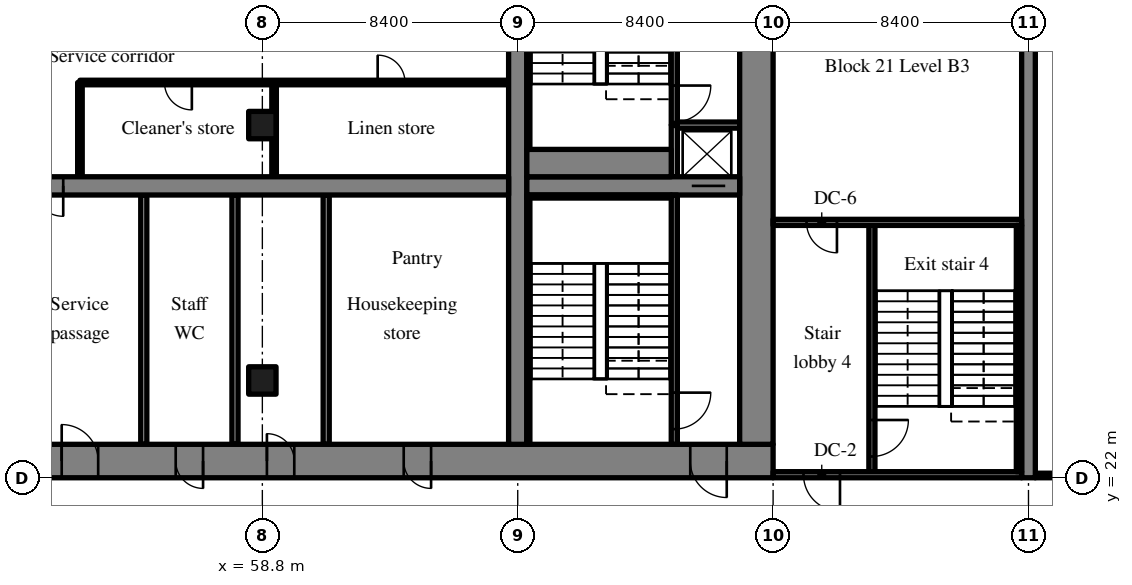
"""IFC4 building model, lengths in metres.
Left out: names, types, materials, properties, quantities, classifications, styles, units other than length and angle.
Written with IfcOpenShell. Run it as: python <this file> out.ifc"""

import sys

from ifc_helpers import new_model, si_unit, direction, frame, frame_2d, origin, origin_2d, place, context, subcontext, project, spatial, rectangle, extrude, source, transform, mapped, element, fill, save


model = new_model("IFC4")
c1 = context("Model", 3, precision=1e-05, world=origin(), true_north=direction((0.0, 1.0)))
c2 = subcontext(c1, "Body", "Model", "MODEL_VIEW")
j1 = project(units=[si_unit("LENGTHUNIT", "METRE"), si_unit("PLANEANGLEUNIT", "RADIAN")], contexts=[c1])
p1 = place(None, origin())
s1 = spatial("IfcSite", under=j1, at=p1, CompositionType="ELEMENT")
p2 = place(p1, origin())
s2 = spatial("IfcBuilding", under=s1, at=p2, CompositionType="ELEMENT")
p3 = place(p2, frame((0.0, 0.0, -13.5)))
s3 = spatial("IfcBuildingStorey", under=s2, at=p3, CompositionType="ELEMENT", Elevation=-13.5)
m1 = source(origin(), c2, "Body", "SweptSolid", [
    extrude(rectangle(XDim=50.4, YDim=1.1, at=frame_2d((25.2, 0.0))), origin(), (0.0, 0.0, 1.0), 4.52),
])
p4 = place(p3, frame((25.2, 22.55, -0.3), z_axis=(0.0, 0.0, 1.0), x_axis=(1.0, 0.0, 0.0)))
e1 = element("IfcWall", 1, at=p4, inside=s3, PredefinedType="SHEAR", context=c2, shape_type="MappedRepresentation", body=[
    mapped(m1, transform((0.0, 0.0, 0.0), scale=1.0)),
])
m2 = source(origin(), c2, "Body", "SweptSolid", [
    extrude(rectangle(XDim=1.8, YDim=2.1, at=frame_2d((0.9, 1.05))), frame((0.0, 0.56, 0.0), z_axis=(0.0, -1.0, 0.0), x_axis=(1.0, 0.0, 0.0)), (0.0, 0.0, 1.0), 1.12),
])
p5 = place(p4, frame((15.9, 0.0, 0.0)))
e2 = element("IfcOpeningElement", 2, at=p5, cuts=e1, PredefinedType="OPENING", context=c2, shape_type="MappedRepresentation", body=[
    mapped(m2, transform((0.0, 0.0, 0.0), scale=1.0)),
])
m3 = source(origin(), c2, "Body", "SweptSolid", [
    extrude(rectangle(XDim=1.2, YDim=2.1, at=frame_2d((0.6, 1.05))), frame((0.0, 0.56, 0.0), z_axis=(0.0, -1.0, 0.0), x_axis=(1.0, 0.0, 0.0)), (0.0, 0.0, 1.0), 1.12),
])
p6 = place(p4, frame((27.0, 0.0, 0.0)))
e3 = element("IfcOpeningElement", 3, at=p6, cuts=e1, PredefinedType="OPENING", context=c2, shape_type="MappedRepresentation", body=[
    mapped(m3, transform((0.0, 0.0, 0.0), scale=1.0)),
])
m4 = source(origin(), c2, "Body", "SweptSolid", [
    extrude(rectangle(XDim=0.9, YDim=2.1, at=frame_2d((0.45, 1.05))), frame((0.0, 0.56, 0.0), z_axis=(0.0, -1.0, 0.0), x_axis=(1.0, 0.0, 0.0)), (0.0, 0.0, 1.0), 1.12),
])
p7 = place(p4, frame((33.75, 0.0, 0.0)))
e4 = element("IfcOpeningElement", 4, at=p7, cuts=e1, PredefinedType="OPENING", context=c2, shape_type="MappedRepresentation", body=[
    mapped(m4, transform((0.0, 0.0, 0.0), scale=1.0)),
])
p8 = place(p4, frame((30.75, 0.0, 0.0)))
e5 = element("IfcOpeningElement", 5, at=p8, cuts=e1, PredefinedType="OPENING", context=c2, shape_type="MappedRepresentation", body=[
    mapped(m4, transform((0.0, 0.0, 0.0), scale=1.0)),
])
p9 = place(p4, frame((38.25, 0.0, 0.0)))
e6 = element("IfcOpeningElement", 6, at=p9, cuts=e1, PredefinedType="OPENING", context=c2, shape_type="MappedRepresentation", body=[
    mapped(m4, transform((0.0, 0.0, 0.0), scale=1.0)),
])
p10 = place(p4, frame((6.425, 0.0, 0.0)))
e7 = element("IfcOpeningElement", 7, at=p10, cuts=e1, PredefinedType="OPENING", context=c2, shape_type="MappedRepresentation", body=[
    mapped(m3, transform((0.0, 0.0, 0.0), scale=1.0)),
])
p11 = place(p4, frame((47.675, 0.0, 0.0)))
e8 = element("IfcOpeningElement", 8, at=p11, cuts=e1, PredefinedType="OPENING", context=c2, shape_type="MappedRepresentation", body=[
    mapped(m3, transform((0.0, 0.0, 0.0), scale=1.0)),
])
m5 = source(origin(), c2, "Body", "SweptSolid", [
    extrude(rectangle(XDim=17.8, YDim=1.1, at=frame_2d((8.9, 0.0))), origin(), (0.0, 0.0, 1.0), 4.52),
])
p12 = place(p3, frame((75.05, 23.1, -0.3), z_axis=(0.0, 0.0, 1.0), x_axis=(0.0, 1.0, 0.0)))
e9 = element("IfcWall", 9, at=p12, inside=s3, PredefinedType="SHEAR", context=c2, shape_type="MappedRepresentation", body=[
    mapped(m5, transform((0.0, 0.0, 0.0), scale=1.0)),
])
m6 = source(origin(), c2, "Body", "SweptSolid", [
    extrude(rectangle(XDim=17.8, YDim=0.6, at=frame_2d((8.9, 0.0))), origin(), (0.0, 0.0, 1.0), 4.52),
])
p13 = place(p3, frame((67.2, 23.1, -0.3), z_axis=(0.0, 0.0, 1.0), x_axis=(0.0, 1.0, 0.0)))
e10 = element("IfcWall", 10, at=p13, inside=s3, PredefinedType="SHEAR", context=c2, shape_type="MappedRepresentation", body=[
    mapped(m6, transform((0.0, 0.0, 0.0), scale=1.0)),
])
m7 = source(origin(), c2, "Body", "SweptSolid", [
    extrude(rectangle(XDim=16.2, YDim=0.6, at=frame_2d((8.1, 0.0))), origin(), (0.0, 0.0, 1.0), 4.52),
])
p14 = place(p3, frame((50.7, 31.6, -0.3), z_axis=(0.0, 0.0, 1.0), x_axis=(1.0, 0.0, 0.0)))
e11 = element("IfcWall", 11, at=p14, inside=s3, PredefinedType="SHEAR", context=c2, shape_type="MappedRepresentation", body=[
    mapped(m7, transform((0.0, 0.0, 0.0), scale=1.0)),
])
m8 = source(origin(), c2, "Body", "SweptSolid", [
    extrude(rectangle(XDim=1.0, YDim=2.1, at=frame_2d((0.5, 1.05))), frame((0.0, 0.31, 0.0), z_axis=(0.0, -1.0, 0.0), x_axis=(1.0, 0.0, 0.0)), (0.0, 0.0, 1.0), 0.62),
])
p15 = place(p14, frame((0.55, 0.0, 0.0)))
e12 = element("IfcOpeningElement", 12, at=p15, cuts=e11, PredefinedType="OPENING", context=c2, shape_type="MappedRepresentation", body=[
    mapped(m8, transform((0.0, 0.0, 0.0), scale=1.0)),
])
m9 = source(origin(), c2, "Body", "SweptSolid", [
    extrude(rectangle(XDim=7.0, YDim=0.6, at=frame_2d((3.5, 0.0))), origin(), (0.0, 0.0, 1.0), 4.52),
])
p16 = place(p3, frame((67.5, 31.6, -0.3), z_axis=(0.0, 0.0, 1.0), x_axis=(1.0, 0.0, 0.0)))
e13 = element("IfcWall", 13, at=p16, inside=s3, PredefinedType="SHEAR", context=c2, shape_type="MappedRepresentation", body=[
    mapped(m9, transform((0.0, 0.0, 0.0), scale=1.0)),
])
m10 = source(origin(), c2, "Body", "SweptSolid", [
    extrude(rectangle(XDim=1.1, YDim=2.1, at=frame_2d((0.55, 1.05))), frame((0.0, 0.31, 0.0), z_axis=(0.0, -1.0, 0.0), x_axis=(1.0, 0.0, 0.0)), (0.0, 0.0, 1.0), 0.62),
])
p17 = place(p16, frame((5.425, 0.0, 0.0)))
e14 = element("IfcOpeningElement", 14, at=p17, cuts=e13, PredefinedType="OPENING", context=c2, shape_type="MappedRepresentation", body=[
    mapped(m10, transform((0.0, 0.0, 0.0), scale=1.0)),
])
m11 = source(origin(), c2, "Body", "SweptSolid", [
    extrude(rectangle(XDim=20.0, YDim=0.45, at=frame_2d((10.0, 0.0))), origin(), (0.0, 0.0, 1.0), 4.52),
])
p18 = place(p3, frame((84.0, 22.0, -0.3), z_axis=(0.0, 0.0, 1.0), x_axis=(0.0, 1.0, 0.0)))
e15 = element("IfcWall", 15, at=p18, inside=s3, PredefinedType="SHEAR", context=c2, shape_type="MappedRepresentation", body=[
    mapped(m11, transform((0.0, 0.0, 0.0), scale=1.0)),
])
m12 = source(origin(), c2, "Body", "SweptSolid", [
    extrude(rectangle(XDim=0.9, YDim=0.9, at=origin_2d()), origin(), (0.0, 0.0, 1.0), 4.52),
])
for number, where, z_axis, x_axis in (
    (16, (58.8, 25.2, -0.3), (0.0, 0.0, 1.0), (1.0, 0.0, 0.0)),
    (17, (58.8, 33.6, -0.3), (0.0, 0.0, 1.0), (1.0, 0.0, 0.0)),
):
    element("IfcColumn", number, at=place(p3, frame(where, z_axis=z_axis, x_axis=x_axis)), inside=s3, PredefinedType="COLUMN", context=c2, shape_type="MappedRepresentation", body=[
        mapped(m12, transform((0.0, 0.0, 0.0), scale=1.0)),
    ])
m13 = source(origin(), c2, "Body", "SweptSolid", [
    extrude(rectangle(XDim=8.2, YDim=0.2, at=frame_2d((4.1, 0.0))), origin(), (0.0, 0.0, 1.0), 4.22),
])
for number, where, z_axis, x_axis in (
    (18, (54.9, 23.1, 0.0), (0.0, 0.0, 1.0), (0.0, 1.0, 0.0)),
    (19, (60.9, 23.1, 0.0), (0.0, 0.0, 1.0), (0.0, 1.0, 0.0)),
    (20, (57.9, 23.1, 0.0), (0.0, 0.0, 1.0), (0.0, 1.0, 0.0)),
):
    element("IfcWall", number, at=place(p3, frame(where, z_axis=z_axis, x_axis=x_axis)), inside=s3, PredefinedType="PARTITIONING", context=c2, shape_type="MappedRepresentation", body=[
        mapped(m13, transform((0.0, 0.0, 0.0), scale=1.0)),
    ])
m14 = source(origin(), c2, "Body", "SweptSolid", [
    extrude(rectangle(XDim=3.1, YDim=0.15, at=frame_2d((1.55, 0.0))), origin(), (0.0, 0.0, 1.0), 4.22),
])
p19 = place(p3, frame((52.8, 31.9, 0.0), z_axis=(0.0, 0.0, 1.0), x_axis=(0.0, 1.0, 0.0)))
e21 = element("IfcWall", 21, at=p19, inside=s3, PredefinedType="PARTITIONING", context=c2, shape_type="MappedRepresentation", body=[
    mapped(m14, transform((0.0, 0.0, 0.0), scale=1.0)),
])
m15 = source(origin(), c2, "Body", "SweptSolid", [
    extrude(rectangle(XDim=14.1, YDim=0.15, at=frame_2d((7.05, 0.0))), origin(), (0.0, 0.0, 1.0), 4.22),
])
p20 = place(p3, frame((66.9, 35.0, 0.0), z_axis=(0.0, 0.0, 1.0), x_axis=(-1.0, 0.0, 0.0)))
e22 = element("IfcWall", 22, at=p20, inside=s3, PredefinedType="PARTITIONING", context=c2, shape_type="MappedRepresentation", body=[
    mapped(m15, transform((0.0, 0.0, 0.0), scale=1.0)),
])
m16 = source(origin(), c2, "Body", "SweptSolid", [
    extrude(rectangle(XDim=0.9, YDim=2.1, at=frame_2d((0.45, 1.05))), frame((0.0, 0.085, 0.0), z_axis=(0.0, -1.0, 0.0), x_axis=(1.0, 0.0, 0.0)), (0.0, 0.0, 1.0), 0.17),
])
p21 = place(p20, frame((3.407, 0.0, 0.0)))
e23 = element("IfcOpeningElement", 23, at=p21, cuts=e22, PredefinedType="OPENING", context=c2, shape_type="MappedRepresentation", body=[
    mapped(m16, transform((0.0, 0.0, 0.0), scale=1.0)),
])
p22 = place(p20, frame((10.419, 0.0, 0.0)))
e24 = element("IfcOpeningElement", 24, at=p22, cuts=e22, PredefinedType="OPENING", context=c2, shape_type="MappedRepresentation", body=[
    mapped(m16, transform((0.0, 0.0, 0.0), scale=1.0)),
])
p23 = place(p3, frame((59.186, 31.9, 0.0), z_axis=(0.0, 0.0, 1.0), x_axis=(0.0, 1.0, 0.0)))
e25 = element("IfcWall", 25, at=p23, inside=s3, PredefinedType="PARTITIONING", context=c2, shape_type="MappedRepresentation", body=[
    mapped(m14, transform((0.0, 0.0, 0.0), scale=1.0)),
])
m17 = source(origin(), c2, "Body", "SweptSolid", [
    extrude(rectangle(XDim=8.2, YDim=0.2, at=frame_2d((4.1, 0.0))), origin(), (0.0, 0.0, 1.0), 4.52),
])
p24 = place(p3, frame((72.35, 23.1, -0.3), z_axis=(0.0, 0.0, 1.0), x_axis=(0.0, 1.0, 0.0)))
e26 = element("IfcWall", 26, at=p24, inside=s3, PredefinedType="SOLIDWALL", context=c2, shape_type="MappedRepresentation", body=[
    mapped(m17, transform((0.0, 0.0, 0.0), scale=1.0)),
])
m18 = source(origin(), c2, "Body", "SweptSolid", [
    extrude(rectangle(XDim=1.2, YDim=2.1, at=frame_2d((0.6, 1.05))), frame((0.0, 0.11, 0.0), z_axis=(0.0, -1.0, 0.0), x_axis=(1.0, 0.0, 0.0)), (0.0, 0.0, 1.0), 0.22),
])
p25 = place(p24, frame((0.5, 0.0, 0.0)))
e27 = element("IfcOpeningElement", 27, at=p25, cuts=e26, PredefinedType="OPENING", context=c2, shape_type="MappedRepresentation", body=[
    mapped(m18, transform((0.0, 0.0, 0.0), scale=1.0)),
])
m19 = source(origin(), c2, "Body", "SweptSolid", [
    extrude(rectangle(XDim=1.7, YDim=0.2, at=frame_2d((0.85, 0.0))), origin(), (0.0, 0.0, 1.0), 4.22),
])
p26 = place(p3, frame((72.35, 31.9, 0.0), z_axis=(0.0, 0.0, 1.0), x_axis=(0.0, 1.0, 0.0)))
e28 = element("IfcWall", 28, at=p26, inside=s3, PredefinedType="SOLIDWALL", context=c2, shape_type="MappedRepresentation", body=[
    mapped(m19, transform((0.0, 0.0, 0.0), scale=1.0)),
])
m20 = source(origin(), c2, "Body", "SweptSolid", [
    extrude(rectangle(XDim=2.05, YDim=0.2, at=frame_2d((1.025, 0.0))), origin(), (0.0, 0.0, 1.0), 4.22),
])
p27 = place(p3, frame((72.45, 33.6, 0.0), z_axis=(0.0, 0.0, 1.0), x_axis=(1.0, 0.0, 0.0)))
e29 = element("IfcWall", 29, at=p27, inside=s3, PredefinedType="SOLIDWALL", context=c2, shape_type="MappedRepresentation", body=[
    mapped(m20, transform((0.0, 0.0, 0.0), scale=1.0)),
])
m21 = source(origin(), c2, "Body", "SweptSolid", [
    extrude(rectangle(XDim=7.3, YDim=0.2, at=frame_2d((3.65, 0.0))), origin(), (0.0, 0.0, 1.0), 4.52),
])
p28 = place(p3, frame((72.35, 33.6, -0.3), z_axis=(0.0, 0.0, 1.0), x_axis=(0.0, 1.0, 0.0)))
e30 = element("IfcWall", 30, at=p28, inside=s3, PredefinedType="SOLIDWALL", context=c2, shape_type="MappedRepresentation", body=[
    mapped(m21, transform((0.0, 0.0, 0.0), scale=1.0)),
])
p29 = place(p28, frame((0.1, 0.0, 0.0)))
e31 = element("IfcOpeningElement", 31, at=p29, cuts=e30, PredefinedType="OPENING", context=c2, shape_type="MappedRepresentation", body=[
    mapped(m18, transform((0.0, 0.0, 0.0), scale=1.0)),
])
m22 = source(origin(), c2, "Body", "SweptSolid", [
    extrude(rectangle(XDim=8.3, YDim=0.2, at=frame_2d((4.15, 0.0))), origin(), (0.0, 0.0, 1.0), 4.52),
])
p30 = place(p3, frame((78.85, 22.1, -0.3), z_axis=(0.0, 0.0, 1.0), x_axis=(0.0, 1.0, 0.0)))
e32 = element("IfcWall", 32, at=p30, inside=s3, PredefinedType="SOLIDWALL", context=c2, shape_type="MappedRepresentation", body=[
    mapped(m22, transform((0.0, 0.0, 0.0), scale=1.0)),
])
p31 = place(p30, frame((0.6, 0.0, 0.0)))
e33 = element("IfcOpeningElement", 33, at=p31, cuts=e32, PredefinedType="OPENING", context=c2, shape_type="MappedRepresentation", body=[
    mapped(m18, transform((0.0, 0.0, 0.0), scale=1.0)),
])
m23 = source(origin(), c2, "Body", "SweptSolid", [
    extrude(rectangle(XDim=8.175, YDim=0.2, at=frame_2d((4.087, 0.0))), origin(), (0.0, 0.0, 1.0), 4.52),
])
p32 = place(p3, frame((83.775, 22.1, -0.3), z_axis=(0.0, 0.0, 1.0), x_axis=(-1.0, 0.0, 0.0)))
e34 = element("IfcWall", 34, at=p32, inside=s3, PredefinedType="SOLIDWALL", context=c2, shape_type="MappedRepresentation", body=[
    mapped(m23, transform((0.0, 0.0, 0.0), scale=1.0)),
])
p33 = place(p32, frame((5.975, 0.0, 0.0)))
e35 = element("IfcOpeningElement", 35, at=p33, cuts=e34, PredefinedType="OPENING", context=c2, shape_type="MappedRepresentation", body=[
    mapped(m18, transform((0.0, 0.0, 0.0), scale=1.0)),
])
p34 = place(p3, frame((83.775, 30.4, -0.3), z_axis=(0.0, 0.0, 1.0), x_axis=(-1.0, 0.0, 0.0)))
e36 = element("IfcWall", 36, at=p34, inside=s3, PredefinedType="SOLIDWALL", context=c2, shape_type="MappedRepresentation", body=[
    mapped(m23, transform((0.0, 0.0, 0.0), scale=1.0)),
])
m24 = source(origin(), c2, "Body", "SweptSolid", [
    extrude(rectangle(XDim=1.0, YDim=2.1, at=frame_2d((0.5, 1.05))), frame((0.0, 0.11, 0.0), z_axis=(0.0, -1.0, 0.0), x_axis=(1.0, 0.0, 0.0)), (0.0, 0.0, 1.0), 0.22),
])
p35 = place(p34, frame((6.075, 0.0, 0.0)))
e37 = element("IfcOpeningElement", 37, at=p35, cuts=e36, PredefinedType="OPENING", context=c2, shape_type="MappedRepresentation", body=[
    mapped(m24, transform((0.0, 0.0, 0.0), scale=1.0)),
])
m25 = source(origin(), c2, "Body", "SweptSolid", [
    extrude(rectangle(XDim=4.75, YDim=0.1, at=frame_2d((2.375, 0.0))), origin(), (0.0, 0.0, 1.0), 4.52),
])
p36 = place(p3, frame((67.5, 31.25, -0.3), z_axis=(0.0, 0.0, 1.0), x_axis=(1.0, 0.0, 0.0)))
e38 = element("IfcWall", 38, at=p36, inside=s3, PredefinedType="SOLIDWALL", context=c2, shape_type="MappedRepresentation", body=[
    mapped(m25, transform((0.0, 0.0, 0.0), scale=1.0)),
])
m26 = source(origin(), c2, "Body", "SweptSolid", [
    extrude(rectangle(XDim=8.1, YDim=0.1, at=frame_2d((4.05, 0.0))), origin(), (0.0, 0.0, 1.0), 4.52),
])
p37 = place(p3, frame((67.55, 23.1, -0.3), z_axis=(0.0, 0.0, 1.0), x_axis=(0.0, 1.0, 0.0)))
e39 = element("IfcWall", 39, at=p37, inside=s3, PredefinedType="SOLIDWALL", context=c2, shape_type="MappedRepresentation", body=[
    mapped(m26, transform((0.0, 0.0, 0.0), scale=1.0)),
])
m27 = source(origin(), c2, "Body", "SweptSolid", [
    extrude(rectangle(XDim=4.75, YDim=0.9, at=frame_2d((2.375, 0.0))), origin(), (0.0, 0.0, 1.0), 4.52),
])
p38 = place(p3, frame((67.5, 32.35, -0.3), z_axis=(0.0, 0.0, 1.0), x_axis=(1.0, 0.0, 0.0)))
e40 = element("IfcWall", 40, at=p38, inside=s3, PredefinedType="SOLIDWALL", context=c2, shape_type="MappedRepresentation", body=[
    mapped(m27, transform((0.0, 0.0, 0.0), scale=1.0)),
])
p39 = place(p3, frame((67.55, 32.8, -0.3), z_axis=(0.0, 0.0, 1.0), x_axis=(0.0, 1.0, 0.0)))
e41 = element("IfcWall", 41, at=p39, inside=s3, PredefinedType="SOLIDWALL", context=c2, shape_type="MappedRepresentation", body=[
    mapped(m26, transform((0.0, 0.0, 0.0), scale=1.0)),
])
m28 = source(origin(), c2, "Body", "SweptSolid", [
    extrude(rectangle(XDim=8.1, YDim=0.175, at=frame_2d((4.05, 0.0))), origin(), (0.0, 0.0, 1.0), 4.52),
])
p40 = place(p3, frame((83.688, 22.2, -0.3), z_axis=(0.0, 0.0, 1.0), x_axis=(0.0, 1.0, 0.0)))
e42 = element("IfcWall", 42, at=p40, inside=s3, PredefinedType="SOLIDWALL", context=c2, shape_type="MappedRepresentation", body=[
    mapped(m28, transform((0.0, 0.0, 0.0), scale=1.0)),
])
m29 = source(origin(), c2, "Body", "SweptSolid", [
    extrude(rectangle(XDim=7.95, YDim=0.15, at=frame_2d((3.975, 0.0))), origin(), (0.0, 0.0, 1.0), 4.22),
])
p41 = place(p3, frame((84.225, 22.075, 0.0), z_axis=(0.0, 0.0, 1.0), x_axis=(1.0, 0.0, 0.0)))
e43 = element("IfcWall", 43, at=p41, inside=s3, PredefinedType="PARTITIONING", context=c2, shape_type="MappedRepresentation", body=[
    mapped(m29, transform((0.0, 0.0, 0.0), scale=1.0)),
])
m30 = source(origin(), c2, "Body", "SweptSolid", [
    extrude(rectangle(XDim=1.2, YDim=2.1, at=frame_2d((0.6, 1.05))), frame((0.0, 0.325, 0.0), z_axis=(0.0, -1.0, 0.0), x_axis=(1.0, 0.0, 0.0)), (0.0, 0.0, 1.0), 0.05),
])
p42 = place(p6, origin())
e44 = element("IfcDoor", 44, at=p42, inside=s3, OperationType="SINGLE_SWING_LEFT", PredefinedType="DOOR", context=c2, shape_type="MappedRepresentation", body=[
    mapped(m30, transform((0.0, 0.0, 0.0), scale=1.0)),
])
fill(e3, e44)
m31 = source(origin(), c2, "Body", "SweptSolid", [
    extrude(rectangle(XDim=1.0, YDim=2.1, at=frame_2d((0.5, 1.05))), frame((0.0, 0.025, 0.0), z_axis=(0.0, -1.0, 0.0), x_axis=(1.0, 0.0, 0.0)), (0.0, 0.0, 1.0), 0.05),
])
p43 = place(p15, origin())
e45 = element("IfcDoor", 45, at=p43, inside=s3, OperationType="SINGLE_SWING_RIGHT", PredefinedType="DOOR", context=c2, shape_type="MappedRepresentation", body=[
    mapped(m31, transform((0.0, 0.0, 0.0), scale=1.0)),
])
fill(e12, e45)
m32 = source(origin(), c2, "Body", "SweptSolid", [
    extrude(rectangle(XDim=0.9, YDim=2.1, at=frame_2d((0.45, 1.05))), frame((0.0, 0.325, 0.0), z_axis=(0.0, -1.0, 0.0), x_axis=(1.0, 0.0, 0.0)), (0.0, 0.0, 1.0), 0.05),
])
p44 = place(p7, origin())
e46 = element("IfcDoor", 46, at=p44, inside=s3, OperationType="SINGLE_SWING_LEFT", PredefinedType="DOOR", context=c2, shape_type="MappedRepresentation", body=[
    mapped(m32, transform((0.0, 0.0, 0.0), scale=1.0)),
])
fill(e4, e46)
p45 = place(p8, origin())
e47 = element("IfcDoor", 47, at=p45, inside=s3, OperationType="SINGLE_SWING_RIGHT", PredefinedType="DOOR", context=c2, shape_type="MappedRepresentation", body=[
    mapped(m32, transform((0.0, 0.0, 0.0), scale=1.0)),
])
fill(e5, e47)
p46 = place(p9, origin())
e48 = element("IfcDoor", 48, at=p46, inside=s3, OperationType="SINGLE_SWING_RIGHT", PredefinedType="DOOR", context=c2, shape_type="MappedRepresentation", body=[
    mapped(m32, transform((0.0, 0.0, 0.0), scale=1.0)),
])
fill(e6, e48)
m33 = source(origin(), c2, "Body", "SweptSolid", [
    extrude(rectangle(XDim=0.9, YDim=2.1, at=frame_2d((0.45, 1.05))), frame((0.0, 0.025, 0.0), z_axis=(0.0, -1.0, 0.0), x_axis=(1.0, 0.0, 0.0)), (0.0, 0.0, 1.0), 0.05),
])
p47 = place(p21, origin())
e49 = element("IfcDoor", 49, at=p47, inside=s3, OperationType="SINGLE_SWING_RIGHT", PredefinedType="DOOR", context=c2, shape_type="MappedRepresentation", body=[
    mapped(m33, transform((0.0, 0.0, 0.0), scale=1.0)),
])
fill(e23, e49)
p48 = place(p22, origin())
e50 = element("IfcDoor", 50, at=p48, inside=s3, OperationType="SINGLE_SWING_LEFT", PredefinedType="DOOR", context=c2, shape_type="MappedRepresentation", body=[
    mapped(m33, transform((0.0, 0.0, 0.0), scale=1.0)),
])
fill(e24, e50)
m34 = source(origin(), c2, "Body", "SweptSolid", [
    extrude(rectangle(XDim=1.2, YDim=2.1, at=frame_2d((0.6, 1.05))), frame((0.0, 0.025, 0.0), z_axis=(0.0, -1.0, 0.0), x_axis=(1.0, 0.0, 0.0)), (0.0, 0.0, 1.0), 0.05),
])
p49 = place(p25, origin())
e51 = element("IfcDoor", 51, at=p49, inside=s3, OperationType="SINGLE_SWING_RIGHT", PredefinedType="DOOR", context=c2, shape_type="MappedRepresentation", body=[
    mapped(m34, transform((0.0, 0.0, 0.0), scale=1.0)),
])
fill(e27, e51)
p50 = place(p11, origin())
e52 = element("IfcDoor", 52, at=p50, inside=s3, OperationType="SINGLE_SWING_RIGHT", PredefinedType="DOOR", context=c2, shape_type="MappedRepresentation", body=[
    mapped(m30, transform((0.0, 0.0, 0.0), scale=1.0)),
])
fill(e8, e52)
m35 = source(origin(), c2, "Body", "SweptSolid", [
    extrude(rectangle(XDim=1.1, YDim=2.1, at=frame_2d((0.55, 1.05))), frame((0.0, 0.025, 0.0), z_axis=(0.0, -1.0, 0.0), x_axis=(1.0, 0.0, 0.0)), (0.0, 0.0, 1.0), 0.05),
])
p51 = place(p17, origin())
e53 = element("IfcDoor", 53, at=p51, inside=s3, OperationType="SLIDING_TO_RIGHT", PredefinedType="DOOR", context=c2, shape_type="MappedRepresentation", body=[
    mapped(m35, transform((0.0, 0.0, 0.0), scale=1.0)),
])
fill(e14, e53)
p52 = place(p29, origin())
e54 = element("IfcDoor", 54, at=p52, inside=s3, OperationType="SINGLE_SWING_RIGHT", PredefinedType="DOOR", context=c2, shape_type="MappedRepresentation", body=[
    mapped(m34, transform((0.0, 0.0, 0.0), scale=1.0)),
])
fill(e31, e54)
p53 = place(p31, origin())
e55 = element("IfcDoor", 55, at=p53, inside=s3, OperationType="SINGLE_SWING_RIGHT", PredefinedType="DOOR", context=c2, shape_type="MappedRepresentation", body=[
    mapped(m34, transform((0.0, 0.0, 0.0), scale=1.0)),
])
fill(e33, e55)
p54 = place(p33, origin())
e56 = element("IfcDoor", 56, at=p54, inside=s3, OperationType="SINGLE_SWING_LEFT", PredefinedType="DOOR", context=c2, shape_type="MappedRepresentation", body=[
    mapped(m34, transform((0.0, 0.0, 0.0), scale=1.0)),
])
fill(e35, e56)
p55 = place(p35, origin())
e57 = element("IfcDoor", 57, at=p55, inside=s3, OperationType="SINGLE_SWING_LEFT", PredefinedType="DOOR", context=c2, shape_type="MappedRepresentation", body=[
    mapped(m31, transform((0.0, 0.0, 0.0), scale=1.0)),
])
fill(e37, e57)
save(model, sys.argv[1])
